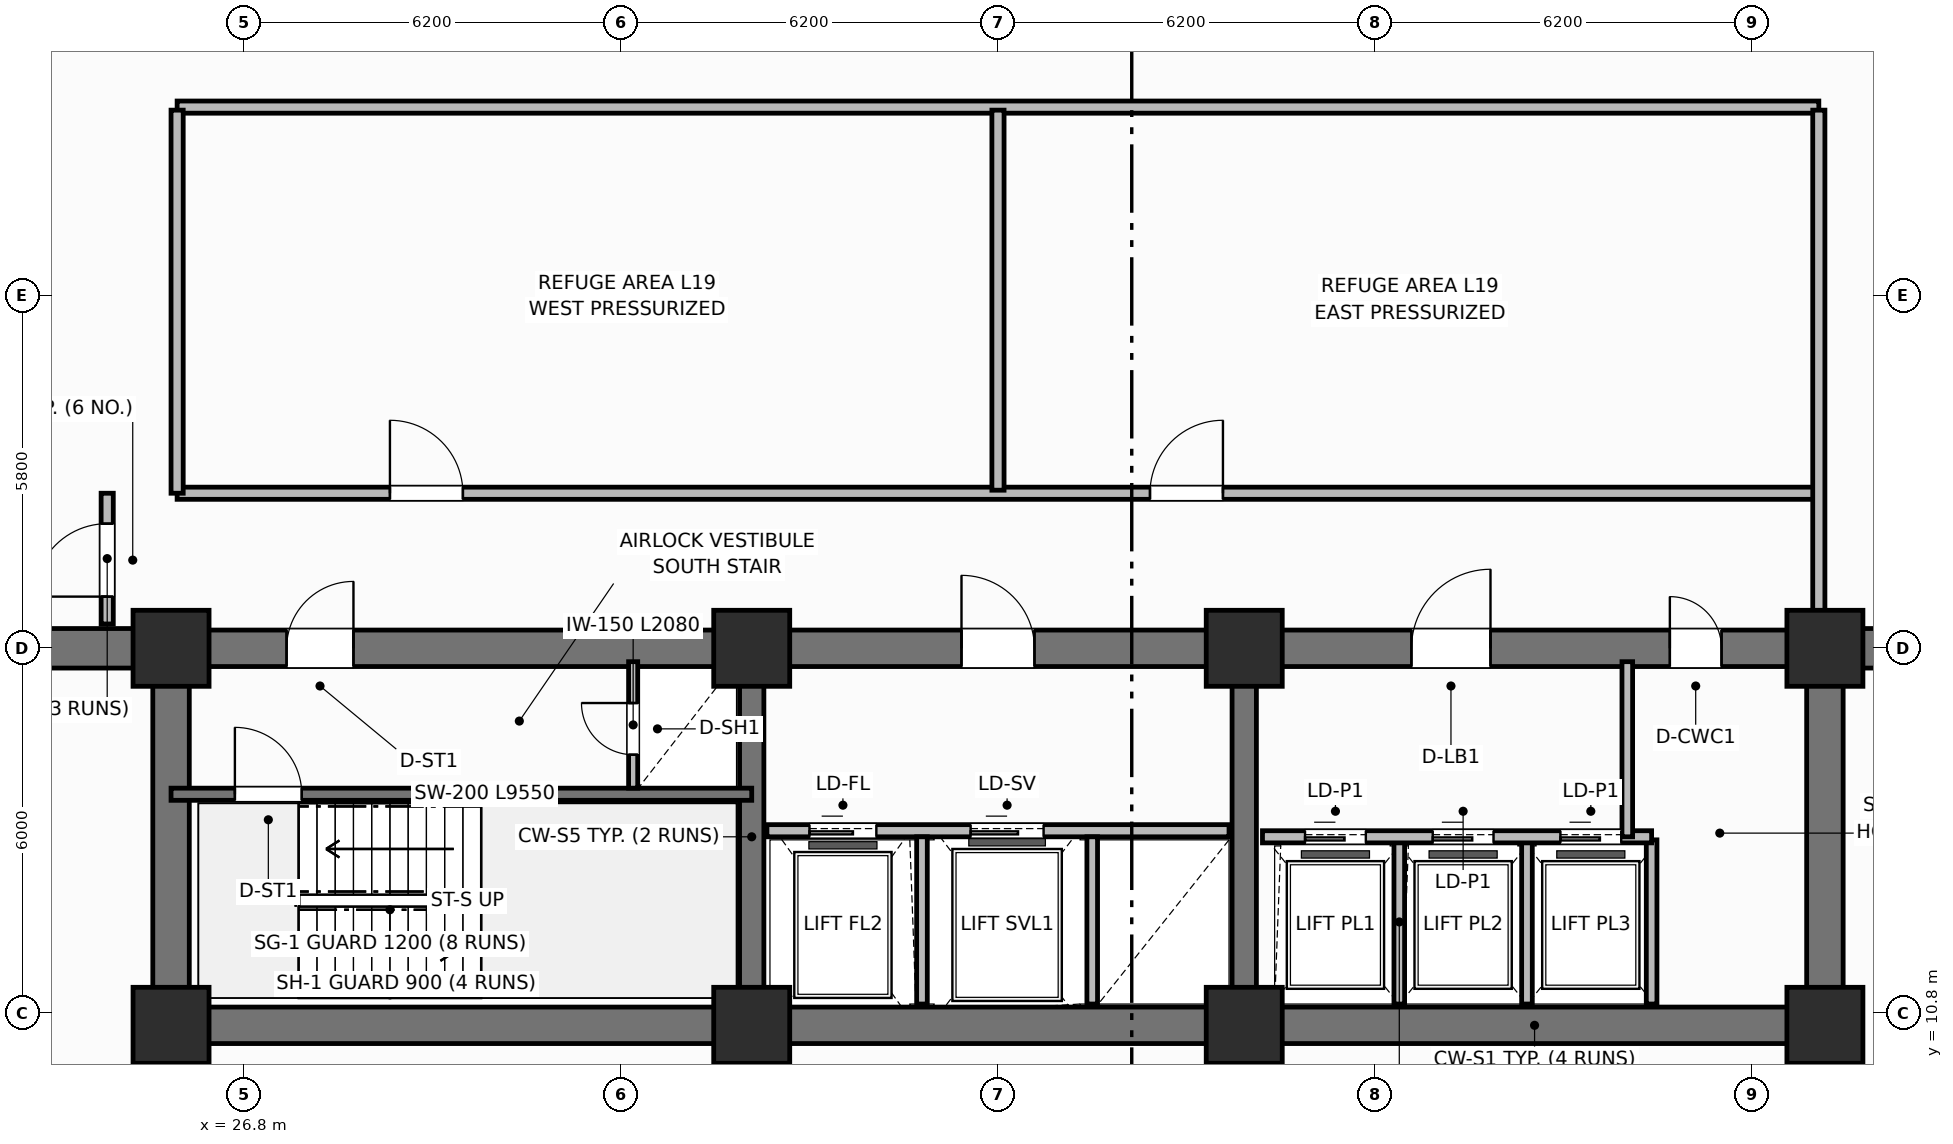
"""IFC4 building model, lengths in metres.
Left out: names, types, materials, properties, quantities, classifications, styles, units other than length and angle.
Written with IfcOpenShell. Run it as: python <this file> out.ifc"""

import sys

from ifc_helpers import new_model, si_unit, direction, frame, frame_2d, origin, origin_2d, place, context, subcontext, project, spatial, rectangle, extrude, element, fill, save


model = new_model("IFC4")
c1 = context("Model", 3, precision=1e-05, world=origin(), true_north=direction((0.0, 1.0)))
c2 = subcontext(c1, "Body", "Model", "MODEL_VIEW")
j1 = project(units=[si_unit("LENGTHUNIT", "METRE"), si_unit("PLANEANGLEUNIT", "RADIAN")], contexts=[c1])
p1 = place(None, origin())
s1 = spatial("IfcSite", under=j1, at=p1, CompositionType="ELEMENT")
p2 = place(p1, origin())
s2 = spatial("IfcBuilding", under=s1, at=p2, CompositionType="ELEMENT")
p3 = place(p2, frame((0.0, 0.0, 76.9)))
s3 = spatial("IfcBuildingStorey", under=s2, at=p3, CompositionType="ELEMENT", Elevation=76.9)
p4 = place(p3, frame((52.8, 10.6, 0.0), z_axis=(0.0, 0.0, 1.0), x_axis=(-1.0, 0.0, 0.0)))
e1 = element("IfcWall", 1, at=p4, inside=s3, PredefinedType="SHEAR", context=c2, shape_type="SweptSolid", body=[
    extrude(rectangle(XDim=27.2, YDim=0.6, at=frame_2d((13.6, 0.0))), origin(), (0.0, 0.0, 1.0), 7.2),
])
for number, where, z_axis, x_axis in (
    (2, (25.6, 10.9, 0.0), (0.0, 0.0, 1.0), (0.0, 1.0, 0.0)),
    (3, (52.8, 10.9, 0.0), (0.0, 0.0, 1.0), (0.0, 1.0, 0.0)),
):
    element("IfcWall", number, at=place(p3, frame(where, z_axis=z_axis, x_axis=x_axis)), inside=s3, PredefinedType="SHEAR", context=c2, shape_type="SweptSolid", body=[
        extrude(rectangle(XDim=5.6, YDim=0.6, at=frame_2d((2.8, 0.0))), origin(), (0.0, 0.0, 1.0), 7.2),
    ])
p5 = place(p3, frame((25.6, 16.8, 0.0), z_axis=(0.0, 0.0, 1.0), x_axis=(1.0, 0.0, 0.0)))
e4 = element("IfcWall", 4, at=p5, inside=s3, PredefinedType="SHEAR", context=c2, shape_type="SweptSolid", body=[
    extrude(rectangle(XDim=27.2, YDim=0.6, at=frame_2d((13.6, 0.0))), origin(), (0.0, 0.0, 1.0), 7.2),
])
p6 = place(p5, frame((1.9, 0.0, 0.0)))
e5 = element("IfcOpeningElement", 5, at=p6, cuts=e4, PredefinedType="OPENING", context=c2, shape_type="SweptSolid", body=[
    extrude(rectangle(XDim=1.1, YDim=2.15, at=frame_2d((0.55, 1.075))), frame((0.0, 0.31, 0.0), z_axis=(0.0, -1.0, 0.0), x_axis=(1.0, 0.0, 0.0)), (0.0, 0.0, 1.0), 0.62),
])
p7 = place(p5, frame((13.0, 0.0, 0.0)))
e6 = element("IfcOpeningElement", 6, at=p7, cuts=e4, PredefinedType="OPENING", context=c2, shape_type="SweptSolid", body=[
    extrude(rectangle(XDim=1.2, YDim=2.15, at=frame_2d((0.6, 1.075))), frame((0.0, 0.31, 0.0), z_axis=(0.0, -1.0, 0.0), x_axis=(1.0, 0.0, 0.0)), (0.0, 0.0, 1.0), 0.62),
])
p8 = place(p5, frame((20.4, 0.0, 0.0)))
e7 = element("IfcOpeningElement", 7, at=p8, cuts=e4, PredefinedType="OPENING", context=c2, shape_type="SweptSolid", body=[
    extrude(rectangle(XDim=1.3, YDim=2.2, at=frame_2d((0.65, 1.1))), frame((0.0, 0.31, 0.0), z_axis=(0.0, -1.0, 0.0), x_axis=(1.0, 0.0, 0.0)), (0.0, 0.0, 1.0), 0.62),
])
p9 = place(p5, frame((24.65, 0.0, 0.0)))
e8 = element("IfcOpeningElement", 8, at=p9, cuts=e4, PredefinedType="OPENING", context=c2, shape_type="SweptSolid", body=[
    extrude(rectangle(XDim=0.85, YDim=2.1, at=frame_2d((0.425, 1.05))), frame((0.0, 0.31, 0.0), z_axis=(0.0, -1.0, 0.0), x_axis=(1.0, 0.0, 0.0)), (0.0, 0.0, 1.0), 0.62),
])
for number, where, z_axis, x_axis in (
    (9, (35.15, 10.9, 0.0), (0.0, 0.0, 1.0), (0.0, 1.0, 0.0)),
    (10, (43.25, 10.9, 0.0), (0.0, 0.0, 1.0), (0.0, 1.0, 0.0)),
):
    element("IfcWall", number, at=place(p3, frame(where, z_axis=z_axis, x_axis=x_axis)), inside=s3, PredefinedType="SHEAR", context=c2, shape_type="SweptSolid", body=[
        extrude(rectangle(XDim=5.6, YDim=0.4, at=frame_2d((2.8, 0.0))), origin(), (0.0, 0.0, 1.0), 7.2),
    ])
for number, where, z_axis, x_axis in (
    (11, (25.6, 10.6, 0.0), (0.0, 0.0, 1.0), (1.0, 0.0, 0.0)),
    (12, (25.6, 16.8, 0.0), (0.0, 0.0, 1.0), (1.0, 0.0, 0.0)),
    (13, (35.15, 10.6, 0.0), (0.0, 0.0, 1.0), (1.0, 0.0, 0.0)),
    (14, (35.15, 16.8, 0.0), (0.0, 0.0, 1.0), (1.0, 0.0, 0.0)),
    (15, (43.25, 10.6, 0.0), (0.0, 0.0, 1.0), (1.0, 0.0, 0.0)),
    (16, (43.25, 16.8, 0.0), (0.0, 0.0, 1.0), (1.0, 0.0, 0.0)),
    (17, (52.8, 10.6, 0.0), (0.0, 0.0, 1.0), (1.0, 0.0, 0.0)),
    (18, (52.8, 16.8, 0.0), (0.0, 0.0, 1.0), (1.0, 0.0, 0.0)),
):
    element("IfcColumn", number, at=place(p3, frame(where, z_axis=z_axis, x_axis=x_axis)), inside=s3, PredefinedType="COLUMN", context=c2, shape_type="SweptSolid", body=[
        extrude(rectangle(XDim=1.25, YDim=1.25, at=origin_2d()), origin(), (0.0, 0.0, 1.0), 7.2),
    ])
for number, where, z_axis, x_axis in (
    (19, (15.05, 16.8, 0.0), (0.0, 0.0, 1.0), (1.0, 0.0, 0.0)),
    (20, (52.8, 16.8, 0.0), (0.0, 0.0, 1.0), (1.0, 0.0, 0.0)),
):
    element("IfcWall", number, at=place(p3, frame(where, z_axis=z_axis, x_axis=x_axis)), inside=s3, PredefinedType="SHEAR", context=c2, shape_type="SweptSolid", body=[
        extrude(rectangle(XDim=10.55, YDim=0.65, at=frame_2d((5.275, 0.0))), origin(), (0.0, 0.0, 1.0), 6.92),
    ])
p10 = place(p3, frame((25.6, 14.4, 0.0), z_axis=(0.0, 0.0, 1.0), x_axis=(1.0, 0.0, 0.0)))
e21 = element("IfcWall", 21, at=p10, inside=s3, PredefinedType="SHEAR", context=c2, shape_type="SweptSolid", body=[
    extrude(rectangle(XDim=9.55, YDim=0.2, at=frame_2d((4.775, 0.0))), origin(), (0.0, 0.0, 1.0), 7.2),
])
p11 = place(p10, frame((1.05, 0.0, 0.0)))
e22 = element("IfcOpeningElement", 22, at=p11, cuts=e21, PredefinedType="OPENING", context=c2, shape_type="SweptSolid", body=[
    extrude(rectangle(XDim=1.1, YDim=2.15, at=frame_2d((0.55, 1.075))), frame((0.0, 0.11, 0.0), z_axis=(0.0, -1.0, 0.0), x_axis=(1.0, 0.0, 0.0)), (0.0, 0.0, 1.0), 0.22),
])
p12 = place(p3, frame((33.2, 14.5, 0.0), z_axis=(0.0, 0.0, 1.0), x_axis=(0.0, 1.0, 0.0)))
e23 = element("IfcWall", 23, at=p12, inside=s3, PredefinedType="PARTITIONING", context=c2, shape_type="SweptSolid", body=[
    extrude(rectangle(XDim=2.08, YDim=0.15, at=frame_2d((1.04, 0.0))), origin(), (0.0, 0.0, 1.0), 5.98),
])
p13 = place(p12, frame((0.55, 0.0, 0.0)))
e24 = element("IfcOpeningElement", 24, at=p13, cuts=e23, PredefinedType="OPENING", context=c2, shape_type="SweptSolid", body=[
    extrude(rectangle(XDim=0.85, YDim=2.05, at=frame_2d((0.425, 1.025))), frame((0.0, 0.085, 0.0), z_axis=(0.0, -1.0, 0.0), x_axis=(1.0, 0.0, 0.0)), (0.0, 0.0, 1.0), 0.17),
])
p14 = place(p3, frame((35.4, 13.8, 0.0), z_axis=(0.0, 0.0, 1.0), x_axis=(1.0, 0.0, 0.0)))
e25 = element("IfcWall", 25, at=p14, inside=s3, PredefinedType="PARTITIONING", context=c2, shape_type="SweptSolid", body=[
    extrude(rectangle(XDim=7.6, YDim=0.2, at=frame_2d((3.8, 0.0))), origin(), (0.0, 0.0, 1.0), 5.8),
])
p15 = place(p14, frame((0.7, 0.0, 0.0)))
e26 = element("IfcOpeningElement", 26, at=p15, cuts=e25, PredefinedType="OPENING", context=c2, shape_type="SweptSolid", body=[
    extrude(rectangle(XDim=1.1, YDim=2.15, at=frame_2d((0.55, 1.075))), frame((0.0, 0.11, 0.0), z_axis=(0.0, -1.0, 0.0), x_axis=(1.0, 0.0, 0.0)), (0.0, 0.0, 1.0), 0.22),
])
p16 = place(p14, frame((3.35, 0.0, 0.0)))
e27 = element("IfcOpeningElement", 27, at=p16, cuts=e25, PredefinedType="OPENING", context=c2, shape_type="SweptSolid", body=[
    extrude(rectangle(XDim=1.2, YDim=2.15, at=frame_2d((0.6, 1.075))), frame((0.0, 0.11, 0.0), z_axis=(0.0, -1.0, 0.0), x_axis=(1.0, 0.0, 0.0)), (0.0, 0.0, 1.0), 0.22),
])
for number, where, z_axis, x_axis in (
    (28, (37.95, 10.95, 0.0), (0.0, 0.0, 1.0), (0.0, 1.0, 0.0)),
    (29, (40.75, 10.95, 0.0), (0.0, 0.0, 1.0), (0.0, 1.0, 0.0)),
):
    element("IfcWall", number, at=place(p3, frame(where, z_axis=z_axis, x_axis=x_axis)), inside=s3, PredefinedType="PARTITIONING", context=c2, shape_type="SweptSolid", body=[
        extrude(rectangle(XDim=2.75, YDim=0.175, at=frame_2d((1.375, 0.0))), origin(), (0.0, 0.0, 1.0), 5.98),
    ])
for number, where, z_axis, x_axis in (
    (30, (45.8, 10.95, 0.0), (0.0, 0.0, 1.0), (0.0, 1.0, 0.0)),
    (31, (47.9, 10.95, 0.0), (0.0, 0.0, 1.0), (0.0, 1.0, 0.0)),
    (32, (49.95, 10.95, 0.0), (0.0, 0.0, 1.0), (0.0, 1.0, 0.0)),
):
    element("IfcWall", number, at=place(p3, frame(where, z_axis=z_axis, x_axis=x_axis)), inside=s3, PredefinedType="PARTITIONING", context=c2, shape_type="SweptSolid", body=[
        extrude(rectangle(XDim=2.7, YDim=0.175, at=frame_2d((1.35, 0.0))), origin(), (0.0, 0.0, 1.0), 5.98),
    ])
p17 = place(p3, frame((43.55, 13.7, 0.0), z_axis=(0.0, 0.0, 1.0), x_axis=(1.0, 0.0, 0.0)))
e33 = element("IfcWall", 33, at=p17, inside=s3, PredefinedType="PARTITIONING", context=c2, shape_type="SweptSolid", body=[
    extrude(rectangle(XDim=6.4, YDim=0.2, at=frame_2d((3.2, 0.0))), origin(), (0.0, 0.0, 1.0), 5.98),
])
p18 = place(p17, frame((0.7, 0.0, 0.0)))
e34 = element("IfcOpeningElement", 34, at=p18, cuts=e33, PredefinedType="OPENING", context=c2, shape_type="SweptSolid", body=[
    extrude(rectangle(XDim=1.0, YDim=2.15, at=frame_2d((0.5, 1.075))), frame((0.0, 0.11, 0.0), z_axis=(0.0, -1.0, 0.0), x_axis=(1.0, 0.0, 0.0)), (0.0, 0.0, 1.0), 0.22),
])
p19 = place(p17, frame((2.8, 0.0, 0.0)))
e35 = element("IfcOpeningElement", 35, at=p19, cuts=e33, PredefinedType="OPENING", context=c2, shape_type="SweptSolid", body=[
    extrude(rectangle(XDim=1.0, YDim=2.15, at=frame_2d((0.5, 1.075))), frame((0.0, 0.11, 0.0), z_axis=(0.0, -1.0, 0.0), x_axis=(1.0, 0.0, 0.0)), (0.0, 0.0, 1.0), 0.22),
])
p20 = place(p17, frame((4.9, 0.0, 0.0)))
e36 = element("IfcOpeningElement", 36, at=p20, cuts=e33, PredefinedType="OPENING", context=c2, shape_type="SweptSolid", body=[
    extrude(rectangle(XDim=1.0, YDim=2.15, at=frame_2d((0.5, 1.075))), frame((0.0, 0.11, 0.0), z_axis=(0.0, -1.0, 0.0), x_axis=(1.0, 0.0, 0.0)), (0.0, 0.0, 1.0), 0.22),
])
p21 = place(p3, frame((49.55, 13.7, 0.0), z_axis=(0.0, 0.0, 1.0), x_axis=(0.0, 1.0, 0.0)))
e37 = element("IfcWall", 37, at=p21, inside=s3, PredefinedType="PARTITIONING", context=c2, shape_type="SweptSolid", body=[
    extrude(rectangle(XDim=2.88, YDim=0.175, at=frame_2d((1.44, 0.0))), origin(), (0.0, 0.0, 1.0), 5.98),
])
p22 = place(p3, frame((25.7, 19.35, 0.0), z_axis=(0.0, 0.0, 1.0), x_axis=(1.0, 0.0, 0.0)))
e38 = element("IfcWall", 38, at=p22, inside=s3, PredefinedType="PARTITIONING", context=c2, shape_type="SweptSolid", body=[
    extrude(rectangle(XDim=27.0, YDim=0.2, at=frame_2d((13.5, 0.0))), origin(), (0.0, 0.0, 1.0), 5.98),
])
p23 = place(p22, frame((3.5, 0.0, 0.0)))
e39 = element("IfcOpeningElement", 39, at=p23, cuts=e38, PredefinedType="OPENING", context=c2, shape_type="SweptSolid", body=[
    extrude(rectangle(XDim=1.2, YDim=2.15, at=frame_2d((0.6, 1.075))), frame((0.0, 0.11, 0.0), z_axis=(0.0, -1.0, 0.0), x_axis=(1.0, 0.0, 0.0)), (0.0, 0.0, 1.0), 0.22),
])
p24 = place(p22, frame((16.0, 0.0, 0.0)))
e40 = element("IfcOpeningElement", 40, at=p24, cuts=e38, PredefinedType="OPENING", context=c2, shape_type="SweptSolid", body=[
    extrude(rectangle(XDim=1.2, YDim=2.15, at=frame_2d((0.6, 1.075))), frame((0.0, 0.11, 0.0), z_axis=(0.0, -1.0, 0.0), x_axis=(1.0, 0.0, 0.0)), (0.0, 0.0, 1.0), 0.22),
])
p25 = place(p3, frame((25.7, 25.7, 0.0), z_axis=(0.0, 0.0, 1.0), x_axis=(1.0, 0.0, 0.0)))
e41 = element("IfcWall", 41, at=p25, inside=s3, PredefinedType="PARTITIONING", context=c2, shape_type="SweptSolid", body=[
    extrude(rectangle(XDim=27.0, YDim=0.2, at=frame_2d((13.5, 0.0))), origin(), (0.0, 0.0, 1.0), 5.98),
])
p26 = place(p3, frame((39.2, 19.4, 0.0), z_axis=(0.0, 0.0, 1.0), x_axis=(0.0, 1.0, 0.0)))
e42 = element("IfcWall", 42, at=p26, inside=s3, PredefinedType="PARTITIONING", context=c2, shape_type="SweptSolid", body=[
    extrude(rectangle(XDim=6.25, YDim=0.2, at=frame_2d((3.125, 0.0))), origin(), (0.0, 0.0, 1.0), 5.98),
])
p27 = place(p3, frame((24.55, 17.2, 0.0), z_axis=(0.0, 0.0, 1.0), x_axis=(0.0, 1.0, 0.0)))
e43 = element("IfcWall", 43, at=p27, inside=s3, PredefinedType="PARTITIONING", context=c2, shape_type="SweptSolid", body=[
    extrude(rectangle(XDim=2.15, YDim=0.2, at=frame_2d((1.075, 0.0))), origin(), (0.0, 0.0, 1.0), 5.98),
])
p28 = place(p27, frame((0.45, 0.0, 0.0)))
e44 = element("IfcOpeningElement", 44, at=p28, cuts=e43, PredefinedType="OPENING", context=c2, shape_type="SweptSolid", body=[
    extrude(rectangle(XDim=1.2, YDim=2.15, at=frame_2d((0.6, 1.075))), frame((0.0, 0.11, 0.0), z_axis=(0.0, -1.0, 0.0), x_axis=(1.0, 0.0, 0.0)), (0.0, 0.0, 1.0), 0.22),
])
p29 = place(p3, frame((25.7, 19.35, 0.0), z_axis=(0.0, 0.0, 1.0), x_axis=(0.0, 1.0, 0.0)))
e45 = element("IfcWall", 45, at=p29, inside=s3, PredefinedType="PARTITIONING", context=c2, shape_type="SweptSolid", body=[
    extrude(rectangle(XDim=6.3, YDim=0.2, at=frame_2d((3.15, 0.0))), origin(), (0.0, 0.0, 1.0), 5.98),
])
p30 = place(p3, frame((52.7, 17.2, 0.0), z_axis=(0.0, 0.0, 1.0), x_axis=(0.0, 1.0, 0.0)))
e46 = element("IfcWall", 46, at=p30, inside=s3, PredefinedType="PARTITIONING", context=c2, shape_type="SweptSolid", body=[
    extrude(rectangle(XDim=8.45, YDim=0.2, at=frame_2d((4.225, 0.0))), origin(), (0.0, 0.0, 1.0), 5.98),
])
p31 = place(p11, origin())
e47 = element("IfcDoor", 47, at=p31, inside=s3, OperationType="SINGLE_SWING_LEFT", PredefinedType="DOOR", context=c2, shape_type="SweptSolid", body=[
    extrude(rectangle(XDim=1.1, YDim=2.15, at=frame_2d((0.55, 1.075))), frame((0.0, 0.025, 0.0), z_axis=(0.0, -1.0, 0.0), x_axis=(1.0, 0.0, 0.0)), (0.0, 0.0, 1.0), 0.05),
])
fill(e22, e47)
p32 = place(p13, origin())
e48 = element("IfcDoor", 48, at=p32, inside=s3, OperationType="SINGLE_SWING_RIGHT", PredefinedType="TRAPDOOR", context=c2, shape_type="SweptSolid", body=[
    extrude(rectangle(XDim=0.85, YDim=2.05, at=frame_2d((0.425, 1.025))), frame((0.0, 0.025, 0.0), z_axis=(0.0, -1.0, 0.0), x_axis=(1.0, 0.0, 0.0)), (0.0, 0.0, 1.0), 0.05),
])
fill(e24, e48)
p33 = place(p15, origin())
e49 = element("IfcDoor", 49, at=p33, inside=s3, OperationType="SLIDING_TO_LEFT", PredefinedType="DOOR", context=c2, shape_type="SweptSolid", body=[
    extrude(rectangle(XDim=1.1, YDim=2.15, at=frame_2d((0.55, 1.075))), frame((0.0, 0.025, 0.0), z_axis=(0.0, -1.0, 0.0), x_axis=(1.0, 0.0, 0.0)), (0.0, 0.0, 1.0), 0.05),
])
fill(e26, e49)
p34 = place(p16, origin())
e50 = element("IfcDoor", 50, at=p34, inside=s3, OperationType="SLIDING_TO_LEFT", PredefinedType="DOOR", context=c2, shape_type="SweptSolid", body=[
    extrude(rectangle(XDim=1.2, YDim=2.15, at=frame_2d((0.6, 1.075))), frame((0.0, 0.025, 0.0), z_axis=(0.0, -1.0, 0.0), x_axis=(1.0, 0.0, 0.0)), (0.0, 0.0, 1.0), 0.05),
])
fill(e27, e50)
p35 = place(p18, origin())
e51 = element("IfcDoor", 51, at=p35, inside=s3, OperationType="SLIDING_TO_LEFT", PredefinedType="DOOR", context=c2, shape_type="SweptSolid", body=[
    extrude(rectangle(XDim=1.0, YDim=2.15, at=frame_2d((0.5, 1.075))), frame((0.0, 0.025, 0.0), z_axis=(0.0, -1.0, 0.0), x_axis=(1.0, 0.0, 0.0)), (0.0, 0.0, 1.0), 0.05),
])
fill(e34, e51)
p36 = place(p19, origin())
e52 = element("IfcDoor", 52, at=p36, inside=s3, OperationType="SLIDING_TO_LEFT", PredefinedType="DOOR", context=c2, shape_type="SweptSolid", body=[
    extrude(rectangle(XDim=1.0, YDim=2.15, at=frame_2d((0.5, 1.075))), frame((0.0, 0.025, 0.0), z_axis=(0.0, -1.0, 0.0), x_axis=(1.0, 0.0, 0.0)), (0.0, 0.0, 1.0), 0.05),
])
fill(e35, e52)
p37 = place(p20, origin())
e53 = element("IfcDoor", 53, at=p37, inside=s3, OperationType="SLIDING_TO_LEFT", PredefinedType="DOOR", context=c2, shape_type="SweptSolid", body=[
    extrude(rectangle(XDim=1.0, YDim=2.15, at=frame_2d((0.5, 1.075))), frame((0.0, 0.025, 0.0), z_axis=(0.0, -1.0, 0.0), x_axis=(1.0, 0.0, 0.0)), (0.0, 0.0, 1.0), 0.05),
])
fill(e36, e53)
p38 = place(p23, origin())
e54 = element("IfcDoor", 54, at=p38, inside=s3, OperationType="SINGLE_SWING_LEFT", PredefinedType="DOOR", context=c2, shape_type="SweptSolid", body=[
    extrude(rectangle(XDim=1.2, YDim=2.15, at=frame_2d((0.6, 1.075))), frame((0.0, 0.025, 0.0), z_axis=(0.0, -1.0, 0.0), x_axis=(1.0, 0.0, 0.0)), (0.0, 0.0, 1.0), 0.05),
])
fill(e39, e54)
p39 = place(p24, origin())
e55 = element("IfcDoor", 55, at=p39, inside=s3, OperationType="SINGLE_SWING_RIGHT", PredefinedType="DOOR", context=c2, shape_type="SweptSolid", body=[
    extrude(rectangle(XDim=1.2, YDim=2.15, at=frame_2d((0.6, 1.075))), frame((0.0, 0.025, 0.0), z_axis=(0.0, -1.0, 0.0), x_axis=(1.0, 0.0, 0.0)), (0.0, 0.0, 1.0), 0.05),
])
fill(e40, e55)
p40 = place(p28, origin())
e56 = element("IfcDoor", 56, at=p40, inside=s3, OperationType="SINGLE_SWING_LEFT", PredefinedType="DOOR", context=c2, shape_type="SweptSolid", body=[
    extrude(rectangle(XDim=1.2, YDim=2.15, at=frame_2d((0.6, 1.075))), frame((0.0, 0.025, 0.0), z_axis=(0.0, -1.0, 0.0), x_axis=(1.0, 0.0, 0.0)), (0.0, 0.0, 1.0), 0.05),
])
fill(e44, e56)
p41 = place(p6, origin())
e57 = element("IfcDoor", 57, at=p41, inside=s3, OperationType="SINGLE_SWING_RIGHT", PredefinedType="DOOR", context=c2, shape_type="SweptSolid", body=[
    extrude(rectangle(XDim=1.1, YDim=2.15, at=frame_2d((0.55, 1.075))), frame((0.0, 0.025, 0.0), z_axis=(0.0, -1.0, 0.0), x_axis=(1.0, 0.0, 0.0)), (0.0, 0.0, 1.0), 0.05),
])
fill(e5, e57)
p42 = place(p7, origin())
e58 = element("IfcDoor", 58, at=p42, inside=s3, OperationType="SINGLE_SWING_LEFT", PredefinedType="DOOR", context=c2, shape_type="SweptSolid", body=[
    extrude(rectangle(XDim=1.2, YDim=2.15, at=frame_2d((0.6, 1.075))), frame((0.0, 0.025, 0.0), z_axis=(0.0, -1.0, 0.0), x_axis=(1.0, 0.0, 0.0)), (0.0, 0.0, 1.0), 0.05),
])
fill(e6, e58)
p43 = place(p8, origin())
e59 = element("IfcDoor", 59, at=p43, inside=s3, OperationType="SINGLE_SWING_RIGHT", PredefinedType="DOOR", context=c2, shape_type="SweptSolid", body=[
    extrude(rectangle(XDim=1.3, YDim=2.2, at=frame_2d((0.65, 1.1))), frame((0.0, 0.025, 0.0), z_axis=(0.0, -1.0, 0.0), x_axis=(1.0, 0.0, 0.0)), (0.0, 0.0, 1.0), 0.05),
])
fill(e7, e59)
p44 = place(p9, origin())
e60 = element("IfcDoor", 60, at=p44, inside=s3, OperationType="SINGLE_SWING_LEFT", PredefinedType="DOOR", context=c2, shape_type="SweptSolid", body=[
    extrude(rectangle(XDim=0.85, YDim=2.1, at=frame_2d((0.425, 1.05))), frame((0.0, 0.025, 0.0), z_axis=(0.0, -1.0, 0.0), x_axis=(1.0, 0.0, 0.0)), (0.0, 0.0, 1.0), 0.05),
])
fill(e8, e60)
save(model, sys.argv[1])
